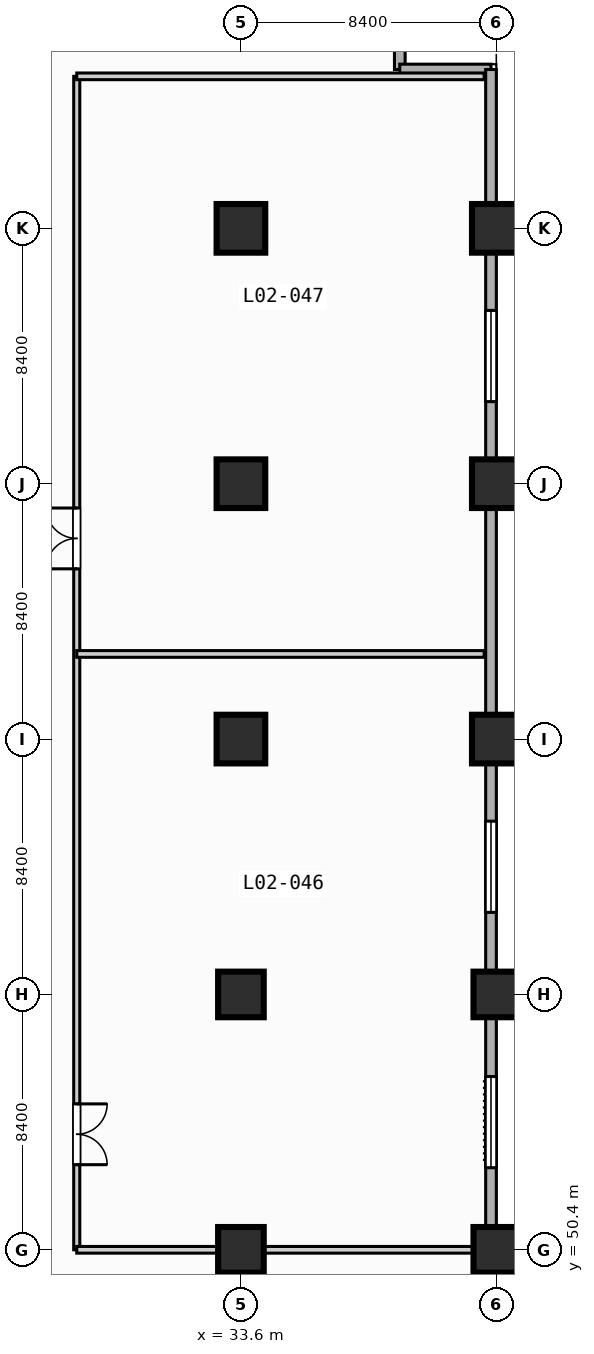
"""IFC4 building model, lengths in metres.
Left out: names, types, materials, properties, quantities, classifications, styles, units other than length and angle.
Written with IfcOpenShell. Run it as: python <this file> out.ifc"""

import sys

from ifc_helpers import new_model, si_unit, direction, frame, frame_2d, origin, origin_2d, place, context, subcontext, project, spatial, rectangle, extrude, element, fill, save


model = new_model("IFC4")
c1 = context("Model", 3, precision=1e-05, world=origin(), true_north=direction((0.0, 1.0)))
c2 = subcontext(c1, "Body", "Model", "MODEL_VIEW")
j1 = project(units=[si_unit("LENGTHUNIT", "METRE"), si_unit("PLANEANGLEUNIT", "RADIAN")], contexts=[c1])
p1 = place(None, origin())
s1 = spatial("IfcSite", under=j1, at=p1, CompositionType="ELEMENT")
p2 = place(p1, origin())
s2 = spatial("IfcBuilding", under=s1, at=p2, CompositionType="ELEMENT")
p3 = place(p2, frame((0.0, 0.0, 10.8)))
s3 = spatial("IfcBuildingStorey", under=s2, at=p3, CompositionType="ELEMENT", Elevation=10.8)
for number, where, z_axis, x_axis in (
    (1, (33.6, 50.4, 0.0), (0.0, 0.0, 1.0), (1.0, 0.0, 0.0)),
    (2, (33.6, 58.8, 0.0), (0.0, 0.0, 1.0), (1.0, 0.0, 0.0)),
):
    element("IfcColumn", number, at=place(p3, frame(where, z_axis=z_axis, x_axis=x_axis)), inside=s3, PredefinedType="COLUMN", context=c2, shape_type="SweptSolid", body=[
        extrude(rectangle(XDim=1.5, YDim=1.5, at=origin_2d()), origin(), (0.0, 0.0, 1.0), 4.8),
    ])
for number, where, z_axis, x_axis in (
    (3, (33.6, 67.2, 0.0), (0.0, 0.0, 1.0), (1.0, 0.0, 0.0)),
    (4, (33.6, 75.6, 0.0), (0.0, 0.0, 1.0), (1.0, 0.0, 0.0)),
    (5, (33.6, 84.0, 0.0), (0.0, 0.0, 1.0), (1.0, 0.0, 0.0)),
):
    element("IfcColumn", number, at=place(p3, frame(where, z_axis=z_axis, x_axis=x_axis)), inside=s3, PredefinedType="COLUMN", context=c2, shape_type="SweptSolid", body=[
        extrude(rectangle(XDim=1.6, YDim=1.6, at=origin_2d()), origin(), (0.0, 0.0, 1.0), 4.8),
    ])
for number, where, z_axis, x_axis in (
    (6, (42.0, 50.4, 0.0), (0.0, 0.0, 1.0), (1.0, 0.0, 0.0)),
    (7, (42.0, 58.8, 0.0), (0.0, 0.0, 1.0), (1.0, 0.0, 0.0)),
):
    element("IfcColumn", number, at=place(p3, frame(where, z_axis=z_axis, x_axis=x_axis)), inside=s3, PredefinedType="COLUMN", context=c2, shape_type="SweptSolid", body=[
        extrude(rectangle(XDim=1.5, YDim=1.5, at=origin_2d()), origin(), (0.0, 0.0, 1.0), 4.8),
    ])
for number, where, z_axis, x_axis in (
    (8, (42.0, 67.2, 0.0), (0.0, 0.0, 1.0), (1.0, 0.0, 0.0)),
    (9, (42.0, 75.6, 0.0), (0.0, 0.0, 1.0), (1.0, 0.0, 0.0)),
    (10, (42.0, 84.0, 0.0), (0.0, 0.0, 1.0), (1.0, 0.0, 0.0)),
):
    element("IfcColumn", number, at=place(p3, frame(where, z_axis=z_axis, x_axis=x_axis)), inside=s3, PredefinedType="COLUMN", context=c2, shape_type="SweptSolid", body=[
        extrude(rectangle(XDim=1.6, YDim=1.6, at=origin_2d()), origin(), (0.0, 0.0, 1.0), 4.8),
    ])
for number, where, z_axis, x_axis in (
    (11, (38.825, 92.225, 0.0), (0.0, 0.0, 1.0), (0.0, -1.0, 0.0)),
    (12, (38.825, 89.225, 0.0), (0.0, 0.0, 1.0), (1.0, 0.0, 0.0)),
):
    element("IfcWall", number, at=place(p3, frame(where, z_axis=z_axis, x_axis=x_axis)), inside=s3, PredefinedType="STANDARD", context=c2, shape_type="SweptSolid", body=[
        extrude(rectangle(XDim=3.0, YDim=0.35, at=frame_2d((1.5, 0.0))), origin(), (0.0, 0.0, 1.0), 4.45),
    ])
p4 = place(p3, frame((41.825, 89.225, 0.0), z_axis=(0.0, 0.0, 1.0), x_axis=(0.0, -1.0, 0.0)))
e13 = element("IfcWall", 13, at=p4, inside=s3, PredefinedType="STANDARD", context=c2, shape_type="SweptSolid", body=[
    extrude(rectangle(XDim=47.4, YDim=0.35, at=frame_2d((23.7, 0.0))), origin(), (0.0, 0.0, 1.0), 4.45),
])
p5 = place(p4, frame((33.125, 0.0, 0.85)))
e14 = element("IfcOpeningElement", 14, at=p5, cuts=e13, PredefinedType="OPENING", context=c2, shape_type="SweptSolid", body=[
    extrude(rectangle(XDim=3.0, YDim=2.4, at=frame_2d((1.5, 1.2))), frame((0.0, 0.185, 0.0), z_axis=(0.0, -1.0, 0.0), x_axis=(1.0, 0.0, 0.0)), (0.0, 0.0, 1.0), 0.37),
])
p6 = place(p4, frame((24.725, 0.0, 0.85)))
e15 = element("IfcOpeningElement", 15, at=p6, cuts=e13, PredefinedType="OPENING", context=c2, shape_type="SweptSolid", body=[
    extrude(rectangle(XDim=3.0, YDim=2.4, at=frame_2d((1.5, 1.2))), frame((0.0, 0.185, 0.0), z_axis=(0.0, -1.0, 0.0), x_axis=(1.0, 0.0, 0.0)), (0.0, 0.0, 1.0), 0.37),
])
p7 = place(p4, frame((7.925, 0.0, 0.85)))
e16 = element("IfcOpeningElement", 16, at=p7, cuts=e13, PredefinedType="OPENING", context=c2, shape_type="SweptSolid", body=[
    extrude(rectangle(XDim=3.0, YDim=2.4, at=frame_2d((1.5, 1.2))), frame((0.0, 0.185, 0.0), z_axis=(0.0, -1.0, 0.0), x_axis=(1.0, 0.0, 0.0)), (0.0, 0.0, 1.0), 0.37),
])
p8 = place(p3, frame((28.2, 50.4, 0.0), z_axis=(0.0, 0.0, 1.0), x_axis=(0.0, 1.0, 0.0)))
e17 = element("IfcWall", 17, at=p8, inside=s3, PredefinedType="PARTITIONING", context=c2, shape_type="SweptSolid", body=[
    extrude(rectangle(XDim=38.6, YDim=0.2, at=frame_2d((19.3, 0.0))), origin(), (0.0, 0.0, 1.0), 4.45),
])
p9 = place(p8, frame((2.8, 0.0, 0.0)))
e18 = element("IfcOpeningElement", 18, at=p9, cuts=e17, PredefinedType="OPENING", context=c2, shape_type="SweptSolid", body=[
    extrude(rectangle(XDim=2.0, YDim=2.15, at=frame_2d((1.0, 1.075))), frame((0.0, 0.11, 0.0), z_axis=(0.0, -1.0, 0.0), x_axis=(1.0, 0.0, 0.0)), (0.0, 0.0, 1.0), 0.22),
])
p10 = place(p8, frame((22.4, 0.0, 0.0)))
e19 = element("IfcOpeningElement", 19, at=p10, cuts=e17, PredefinedType="OPENING", context=c2, shape_type="SweptSolid", body=[
    extrude(rectangle(XDim=2.0, YDim=2.15, at=frame_2d((1.0, 1.075))), frame((0.0, 0.11, 0.0), z_axis=(0.0, -1.0, 0.0), x_axis=(1.0, 0.0, 0.0)), (0.0, 0.0, 1.0), 0.22),
])
p11 = place(p3, frame((28.2, 50.4, 0.0), z_axis=(0.0, 0.0, 1.0), x_axis=(1.0, 0.0, 0.0)))
e20 = element("IfcWall", 20, at=p11, inside=s3, PredefinedType="PARTITIONING", context=c2, shape_type="SweptSolid", body=[
    extrude(rectangle(XDim=13.4, YDim=0.22, at=frame_2d((6.7, 0.0))), origin(), (0.0, 0.0, 1.0), 3.6),
])
for number, where, z_axis, x_axis in (
    (21, (28.2, 70.0, 0.0), (0.0, 0.0, 1.0), (1.0, 0.0, 0.0)),
    (22, (28.2, 89.0, 0.0), (0.0, 0.0, 1.0), (1.0, 0.0, 0.0)),
):
    element("IfcWall", number, at=place(p3, frame(where, z_axis=z_axis, x_axis=x_axis)), inside=s3, PredefinedType="PARTITIONING", context=c2, shape_type="SweptSolid", body=[
        extrude(rectangle(XDim=13.4, YDim=0.22, at=frame_2d((6.7, 0.0))), origin(), (0.0, 0.0, 1.0), 4.45),
    ])
p12 = place(p5, origin())
e23 = element("IfcWindow", 23, at=p12, inside=s3, PartitioningType="SINGLE_PANEL", PredefinedType="WINDOW", context=c2, shape_type="SweptSolid", body=[
    extrude(rectangle(XDim=3.0, YDim=2.4, at=frame_2d((1.5, 1.2))), frame((0.0, 0.03, 0.0), z_axis=(0.0, -1.0, 0.0), x_axis=(1.0, 0.0, 0.0)), (0.0, 0.0, 1.0), 0.06),
])
fill(e14, e23)
p13 = place(p6, origin())
e24 = element("IfcWindow", 24, at=p13, inside=s3, PartitioningType="SINGLE_PANEL", PredefinedType="WINDOW", context=c2, shape_type="SweptSolid", body=[
    extrude(rectangle(XDim=3.0, YDim=2.4, at=frame_2d((1.5, 1.2))), frame((0.0, 0.03, 0.0), z_axis=(0.0, -1.0, 0.0), x_axis=(1.0, 0.0, 0.0)), (0.0, 0.0, 1.0), 0.06),
])
fill(e15, e24)
p14 = place(p7, origin())
e25 = element("IfcWindow", 25, at=p14, inside=s3, PartitioningType="SINGLE_PANEL", PredefinedType="WINDOW", context=c2, shape_type="SweptSolid", body=[
    extrude(rectangle(XDim=3.0, YDim=2.4, at=frame_2d((1.5, 1.2))), frame((0.0, 0.03, 0.0), z_axis=(0.0, -1.0, 0.0), x_axis=(1.0, 0.0, 0.0)), (0.0, 0.0, 1.0), 0.06),
])
fill(e16, e25)
p15 = place(p9, origin())
e26 = element("IfcDoor", 26, at=p15, inside=s3, OperationType="SINGLE_SWING_RIGHT", PredefinedType="DOOR", context=c2, shape_type="SweptSolid", body=[
    extrude(rectangle(XDim=2.0, YDim=2.15, at=frame_2d((1.0, 1.075))), frame((0.0, 0.025, 0.0), z_axis=(0.0, -1.0, 0.0), x_axis=(1.0, 0.0, 0.0)), (0.0, 0.0, 1.0), 0.05),
])
fill(e18, e26)
p16 = place(p10, origin())
e27 = element("IfcDoor", 27, at=p16, inside=s3, OperationType="SINGLE_SWING_LEFT", PredefinedType="DOOR", context=c2, shape_type="SweptSolid", body=[
    extrude(rectangle(XDim=2.0, YDim=2.15, at=frame_2d((1.0, 1.075))), frame((0.0, 0.025, 0.0), z_axis=(0.0, -1.0, 0.0), x_axis=(1.0, 0.0, 0.0)), (0.0, 0.0, 1.0), 0.05),
])
fill(e19, e27)
save(model, sys.argv[1])
